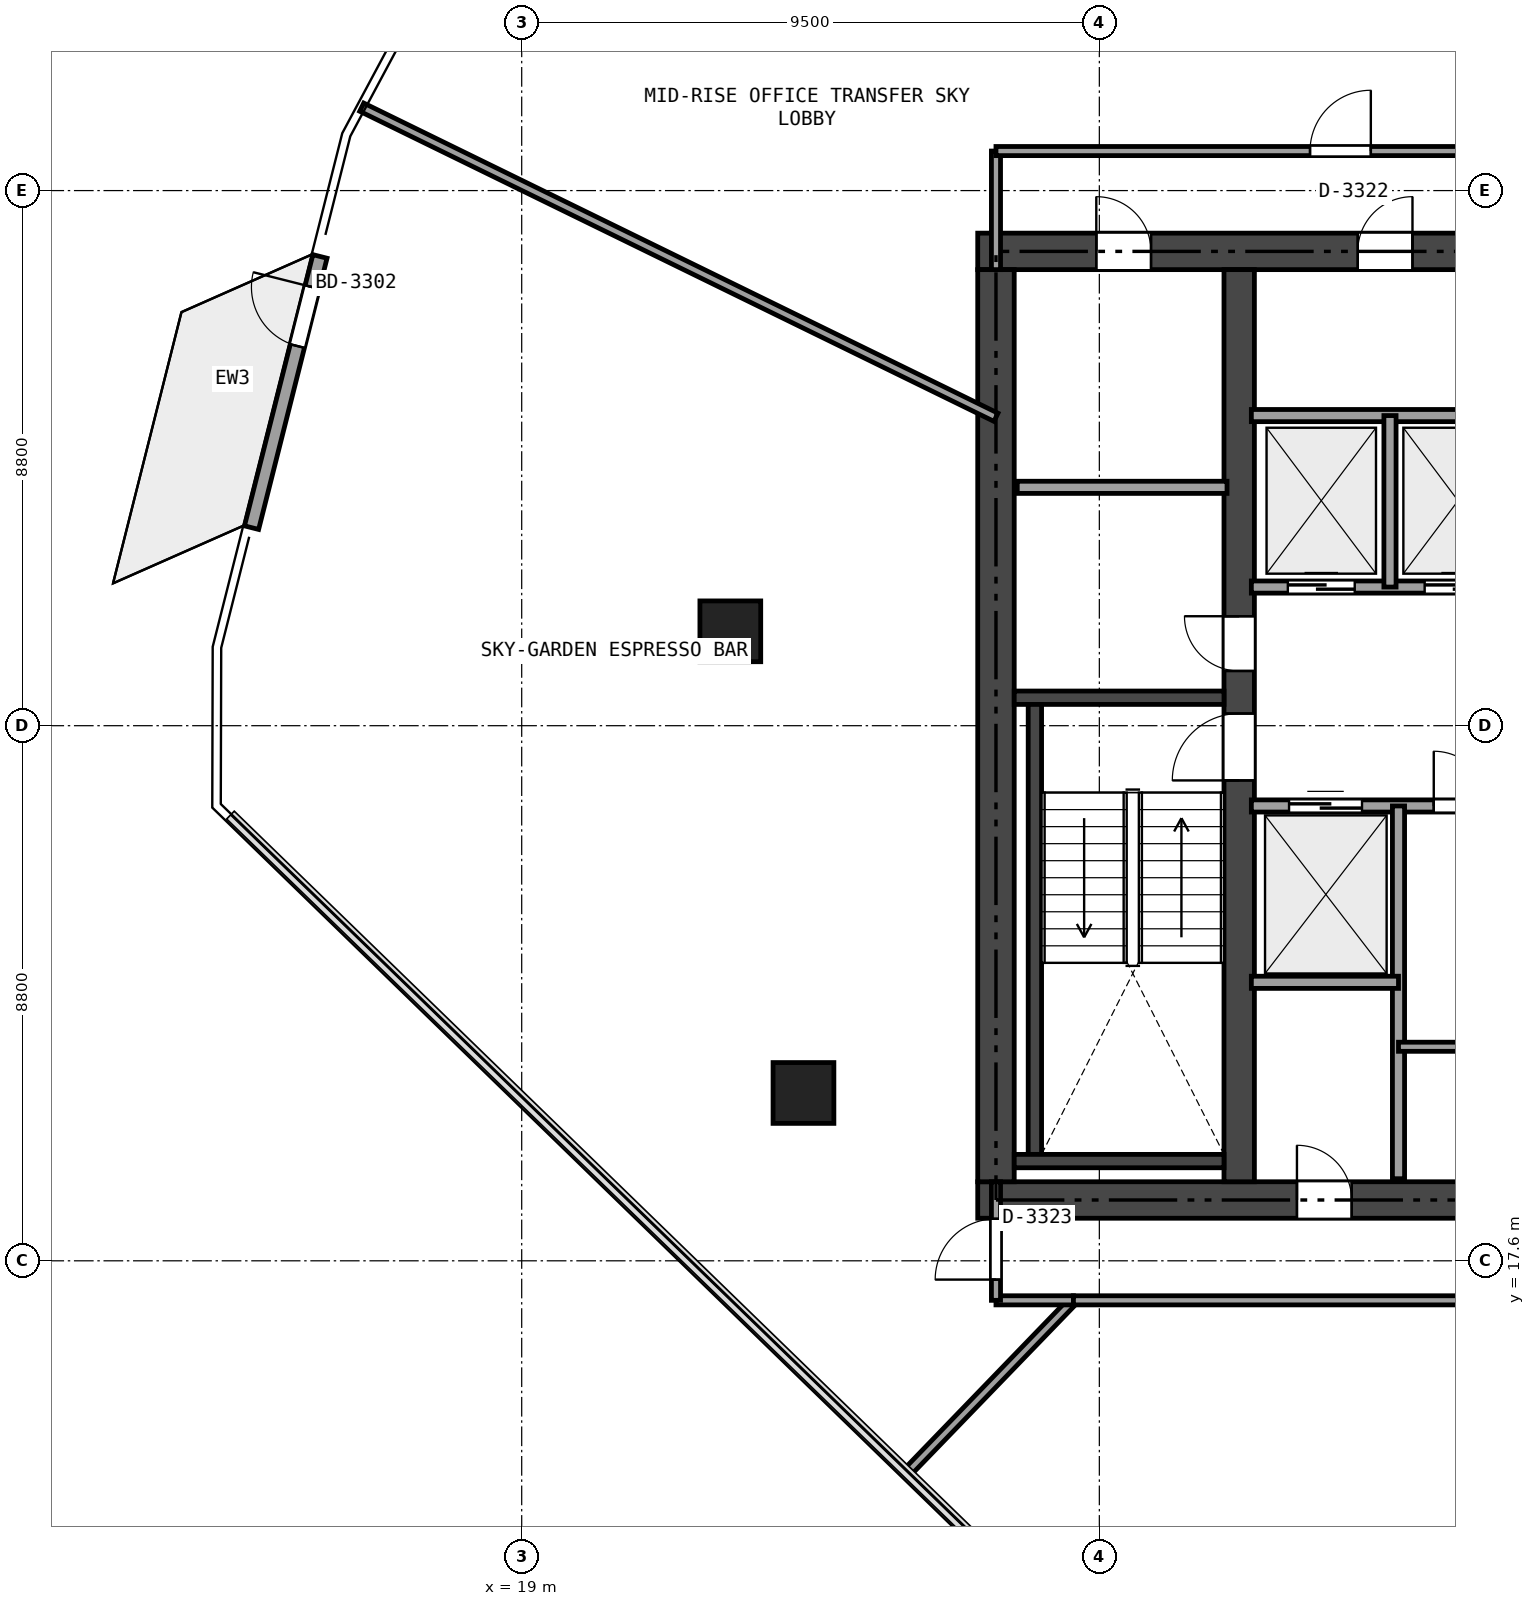
"""IFC4 building model, lengths in metres.
Left out: names, types, materials, properties, quantities, classifications, styles, units other than length and angle.
Written with IfcOpenShell. Run it as: python <this file> out.ifc"""

import sys

from ifc_helpers import new_model, si_unit, direction, frame, frame_2d, origin, origin_2d, place, context, subcontext, project, spatial, rectangle, extrude, element, fill, save


model = new_model("IFC4")
c1 = context("Model", 3, precision=1e-05, world=origin(), true_north=direction((0.0, 1.0)))
c2 = subcontext(c1, "Body", "Model", "MODEL_VIEW")
j1 = project(units=[si_unit("LENGTHUNIT", "METRE"), si_unit("PLANEANGLEUNIT", "RADIAN")], contexts=[c1])
p1 = place(None, origin())
s1 = spatial("IfcSite", under=j1, at=p1, CompositionType="ELEMENT")
p2 = place(p1, origin())
s2 = spatial("IfcBuilding", under=s1, at=p2, CompositionType="ELEMENT")
p3 = place(p2, frame((0.0, 0.0, 125.7)))
s3 = spatial("IfcBuildingStorey", under=s2, at=p3, CompositionType="ELEMENT", Elevation=125.7)
p4 = place(p3, frame((26.5, 18.6, 0.0), z_axis=(0.0, 0.0, 1.0), x_axis=(1.0, 0.0, 0.0)))
e1 = element("IfcWall", 1, at=p4, inside=s3, PredefinedType="SHEAR", context=c2, shape_type="SweptSolid", body=[
    extrude(rectangle(XDim=21.4, YDim=0.6, at=frame_2d((10.7, 0.0))), origin(), (0.0, 0.0, 1.0), 3.32),
])
p5 = place(p4, frame((12.425, 0.0, 0.0)))
e2 = element("IfcOpeningElement", 2, at=p5, cuts=e1, PredefinedType="OPENING", context=c2, shape_type="SweptSolid", body=[
    extrude(rectangle(XDim=1.15, YDim=2.15, at=frame_2d((0.575, 1.075))), frame((0.0, 0.31, 0.0), z_axis=(0.0, -1.0, 0.0), x_axis=(1.0, 0.0, 0.0)), (0.0, 0.0, 1.0), 0.62),
])
p6 = place(p4, frame((5.25, 0.0, 0.0)))
e3 = element("IfcOpeningElement", 3, at=p6, cuts=e1, PredefinedType="OPENING", context=c2, shape_type="SweptSolid", body=[
    extrude(rectangle(XDim=0.9, YDim=2.1, at=frame_2d((0.45, 1.05))), frame((0.0, 0.31, 0.0), z_axis=(0.0, -1.0, 0.0), x_axis=(1.0, 0.0, 0.0)), (0.0, 0.0, 1.0), 0.62),
])
p7 = place(p3, frame((26.5, 34.2, 0.0), z_axis=(0.0, 0.0, 1.0), x_axis=(1.0, 0.0, 0.0)))
e4 = element("IfcWall", 4, at=p7, inside=s3, PredefinedType="SHEAR", context=c2, shape_type="SweptSolid", body=[
    extrude(rectangle(XDim=21.4, YDim=0.6, at=frame_2d((10.7, 0.0))), origin(), (0.0, 0.0, 1.0), 3.32),
])
p8 = place(p7, frame((9.7, 0.0, 0.0)))
e5 = element("IfcOpeningElement", 5, at=p8, cuts=e4, PredefinedType="OPENING", context=c2, shape_type="SweptSolid", body=[
    extrude(rectangle(XDim=1.1, YDim=2.15, at=frame_2d((0.55, 1.075))), frame((0.0, 0.31, 0.0), z_axis=(0.0, -1.0, 0.0), x_axis=(1.0, 0.0, 0.0)), (0.0, 0.0, 1.0), 0.62),
])
p9 = place(p7, frame((1.95, 0.0, 0.0)))
e6 = element("IfcOpeningElement", 6, at=p9, cuts=e4, PredefinedType="OPENING", context=c2, shape_type="SweptSolid", body=[
    extrude(rectangle(XDim=0.9, YDim=2.1, at=frame_2d((0.45, 1.05))), frame((0.0, 0.31, 0.0), z_axis=(0.0, -1.0, 0.0), x_axis=(1.0, 0.0, 0.0)), (0.0, 0.0, 1.0), 0.62),
])
p10 = place(p7, frame((6.25, 0.0, 0.0)))
e7 = element("IfcOpeningElement", 7, at=p10, cuts=e4, PredefinedType="OPENING", context=c2, shape_type="SweptSolid", body=[
    extrude(rectangle(XDim=0.9, YDim=2.1, at=frame_2d((0.45, 1.05))), frame((0.0, 0.31, 0.0), z_axis=(0.0, -1.0, 0.0), x_axis=(1.0, 0.0, 0.0)), (0.0, 0.0, 1.0), 0.62),
])
p11 = place(p3, frame((26.8, 18.9, 0.0), z_axis=(0.0, 0.0, 1.0), x_axis=(0.0, 1.0, 0.0)))
e8 = element("IfcWall", 8, at=p11, inside=s3, PredefinedType="SHEAR", context=c2, shape_type="SweptSolid", body=[
    extrude(rectangle(XDim=15.0, YDim=0.6, at=frame_2d((7.5, 0.0))), origin(), (0.0, 0.0, 1.0), 3.32),
])
p12 = place(p3, frame((30.8, 18.9, 0.0), z_axis=(0.0, 0.0, 1.0), x_axis=(0.0, 1.0, 0.0)))
e9 = element("IfcWall", 9, at=p12, inside=s3, PredefinedType="SHEAR", context=c2, shape_type="SweptSolid", body=[
    extrude(rectangle(XDim=15.0, YDim=0.5, at=frame_2d((7.5, 0.0))), origin(), (0.0, 0.0, 1.0), 3.32),
])
p13 = place(p12, frame((6.6, 0.0, 0.0)))
e10 = element("IfcOpeningElement", 10, at=p13, cuts=e9, PredefinedType="OPENING", context=c2, shape_type="SweptSolid", body=[
    extrude(rectangle(XDim=1.1, YDim=2.15, at=frame_2d((0.55, 1.075))), frame((0.0, 0.26, 0.0), z_axis=(0.0, -1.0, 0.0), x_axis=(1.0, 0.0, 0.0)), (0.0, 0.0, 1.0), 0.52),
])
p14 = place(p12, frame((8.4, 0.0, 0.0)))
e11 = element("IfcOpeningElement", 11, at=p14, cuts=e9, PredefinedType="OPENING", context=c2, shape_type="SweptSolid", body=[
    extrude(rectangle(XDim=0.9, YDim=2.1, at=frame_2d((0.45, 1.05))), frame((0.0, 0.26, 0.0), z_axis=(0.0, -1.0, 0.0), x_axis=(1.0, 0.0, 0.0)), (0.0, 0.0, 1.0), 0.52),
])
p15 = place(p3, frame((27.1, 26.86, 0.0), z_axis=(0.0, 0.0, 1.0), x_axis=(1.0, 0.0, 0.0)))
e12 = element("IfcWall", 12, at=p15, inside=s3, PredefinedType="SHEAR", context=c2, shape_type="SweptSolid", body=[
    extrude(rectangle(XDim=3.45, YDim=0.22, at=frame_2d((1.725, 0.0))), origin(), (0.0, 0.0, 1.0), 3.32),
])
p16 = place(p3, frame((27.44, 19.35, 0.0), z_axis=(0.0, 0.0, 1.0), x_axis=(0.0, 1.0, 0.0)))
e13 = element("IfcWall", 13, at=p16, inside=s3, PredefinedType="SHEAR", context=c2, shape_type="SweptSolid", body=[
    extrude(rectangle(XDim=7.4, YDim=0.22, at=frame_2d((3.7, 0.0))), origin(), (0.0, 0.0, 1.0), 3.32),
])
p17 = place(p3, frame((27.1, 19.24, 0.0), z_axis=(0.0, 0.0, 1.0), x_axis=(1.0, 0.0, 0.0)))
e14 = element("IfcWall", 14, at=p17, inside=s3, PredefinedType="SHEAR", context=c2, shape_type="SweptSolid", body=[
    extrude(rectangle(XDim=3.45, YDim=0.22, at=frame_2d((1.725, 0.0))), origin(), (0.0, 0.0, 1.0), 3.32),
])
for number, where, z_axis, x_axis in (
    (15, (22.431, 27.952, -0.405), (0.0, 0.0, 1.0), (1.0, 0.0, 0.0)),
    (16, (23.634, 20.36, -0.405), (0.0, 0.0, 1.0), (1.0, 0.0, 0.0)),
):
    element("IfcColumn", number, at=place(p3, frame(where, z_axis=z_axis, x_axis=x_axis)), inside=s3, PredefinedType="COLUMN", context=c2, shape_type="SweptSolid", body=[
        extrude(rectangle(XDim=1.0, YDim=1.0, at=origin_2d()), origin(), (0.0, 0.0, 1.0), 3.725),
    ])
p18 = place(p3, frame((14.557, 29.657, 0.0), z_axis=(0.0, 0.0, 1.0), x_axis=(0.244583269574, 0.969628291792, 0.0)))
e17 = element("IfcWall", 17, at=p18, inside=s3, PredefinedType="SOLIDWALL", context=c2, shape_type="SweptSolid", body=[
    extrude(rectangle(XDim=4.6, YDim=0.24, at=frame_2d((2.3, 0.0))), origin(), (0.0, 0.0, 1.0), 3.32),
])
p19 = place(p18, frame((3.08, 0.0, 0.0)))
e18 = element("IfcOpeningElement", 18, at=p19, cuts=e17, PredefinedType="OPENING", context=c2, shape_type="SweptSolid", body=[
    extrude(rectangle(XDim=1.0, YDim=2.15, at=frame_2d((0.5, 1.075))), frame((0.0, 0.13, 0.0), z_axis=(0.0, -1.0, 0.0), x_axis=(1.0, 0.0, 0.0)), (0.0, 0.0, 1.0), 0.26),
])
p20 = place(p3, frame((27.15, 30.32, 0.0), z_axis=(0.0, 0.0, 1.0), x_axis=(1.0, 0.0, 0.0)))
e19 = element("IfcWall", 19, at=p20, inside=s3, PredefinedType="SOLIDWALL", context=c2, shape_type="SweptSolid", body=[
    extrude(rectangle(XDim=3.45, YDim=0.2, at=frame_2d((1.725, 0.0))), origin(), (0.0, 0.0, 1.0), 3.32),
])
p21 = place(p3, frame((31.0, 28.68, 0.0), z_axis=(0.0, 0.0, 1.0), x_axis=(1.0, 0.0, 0.0)))
e20 = element("IfcWall", 20, at=p21, inside=s3, PredefinedType="SOLIDWALL", context=c2, shape_type="SweptSolid", body=[
    extrude(rectangle(XDim=4.42, YDim=0.2, at=frame_2d((2.21, 0.0))), origin(), (0.0, 0.0, 1.0), 3.32),
])
p22 = place(p21, frame((0.6, 0.0, 0.0)))
e21 = element("IfcOpeningElement", 21, at=p22, cuts=e20, PredefinedType="OPENING", context=c2, shape_type="SweptSolid", body=[
    extrude(rectangle(XDim=1.1, YDim=2.15, at=frame_2d((0.55, 1.075))), frame((0.0, 0.11, 0.0), z_axis=(0.0, -1.0, 0.0), x_axis=(1.0, 0.0, 0.0)), (0.0, 0.0, 1.0), 0.22),
])
p23 = place(p21, frame((2.85, 0.0, 0.0)))
e22 = element("IfcOpeningElement", 22, at=p23, cuts=e20, PredefinedType="OPENING", context=c2, shape_type="SweptSolid", body=[
    extrude(rectangle(XDim=1.1, YDim=2.15, at=frame_2d((0.55, 1.075))), frame((0.0, 0.11, 0.0), z_axis=(0.0, -1.0, 0.0), x_axis=(1.0, 0.0, 0.0)), (0.0, 0.0, 1.0), 0.22),
])
p24 = place(p3, frame((31.0, 31.5, 0.0), z_axis=(0.0, 0.0, 1.0), x_axis=(1.0, 0.0, 0.0)))
e23 = element("IfcWall", 23, at=p24, inside=s3, PredefinedType="SOLIDWALL", context=c2, shape_type="SweptSolid", body=[
    extrude(rectangle(XDim=4.42, YDim=0.2, at=frame_2d((2.21, 0.0))), origin(), (0.0, 0.0, 1.0), 3.32),
])
p25 = place(p3, frame((33.28, 28.68, 0.0), z_axis=(0.0, 0.0, 1.0), x_axis=(0.0, 1.0, 0.0)))
e24 = element("IfcWall", 24, at=p25, inside=s3, PredefinedType="SOLIDWALL", context=c2, shape_type="SweptSolid", body=[
    extrude(rectangle(XDim=2.82, YDim=0.2, at=frame_2d((1.41, 0.0))), origin(), (0.0, 0.0, 1.0), 3.32),
])
p26 = place(p3, frame((31.0, 25.08, 0.0), z_axis=(0.0, 0.0, 1.0), x_axis=(1.0, 0.0, 0.0)))
e25 = element("IfcWall", 25, at=p26, inside=s3, PredefinedType="SOLIDWALL", context=c2, shape_type="SweptSolid", body=[
    extrude(rectangle(XDim=4.42, YDim=0.2, at=frame_2d((2.21, 0.0))), origin(), (0.0, 0.0, 1.0), 3.32),
])
p27 = place(p26, frame((3.0, 0.0, 0.0)))
e26 = element("IfcOpeningElement", 26, at=p27, cuts=e25, PredefinedType="OPENING", context=c2, shape_type="SweptSolid", body=[
    extrude(rectangle(XDim=0.9, YDim=2.1, at=frame_2d((0.45, 1.05))), frame((0.0, 0.11, 0.0), z_axis=(0.0, -1.0, 0.0), x_axis=(1.0, 0.0, 0.0)), (0.0, 0.0, 1.0), 0.22),
])
p28 = place(p26, frame((0.62, 0.0, 0.0)))
e27 = element("IfcOpeningElement", 27, at=p28, cuts=e25, PredefinedType="OPENING", context=c2, shape_type="SweptSolid", body=[
    extrude(rectangle(XDim=1.2, YDim=2.15, at=frame_2d((0.6, 1.075))), frame((0.0, 0.11, 0.0), z_axis=(0.0, -1.0, 0.0), x_axis=(1.0, 0.0, 0.0)), (0.0, 0.0, 1.0), 0.22),
])
p29 = place(p3, frame((33.42, 18.95, 0.0), z_axis=(0.0, 0.0, 1.0), x_axis=(0.0, 1.0, 0.0)))
e28 = element("IfcWall", 28, at=p29, inside=s3, PredefinedType="SOLIDWALL", context=c2, shape_type="SweptSolid", body=[
    extrude(rectangle(XDim=6.13, YDim=0.2, at=frame_2d((3.065, 0.0))), origin(), (0.0, 0.0, 1.0), 2.841),
])
p30 = place(p3, frame((31.0, 22.18, 0.0), z_axis=(0.0, 0.0, 1.0), x_axis=(1.0, 0.0, 0.0)))
e29 = element("IfcWall", 29, at=p30, inside=s3, PredefinedType="SOLIDWALL", context=c2, shape_type="SweptSolid", body=[
    extrude(rectangle(XDim=2.42, YDim=0.2, at=frame_2d((1.21, 0.0))), origin(), (0.0, 0.0, 1.0), 3.32),
])
p31 = place(p3, frame((33.42, 21.12, 0.0), z_axis=(0.0, 0.0, 1.0), x_axis=(1.0, 0.0, 0.0)))
e30 = element("IfcWall", 30, at=p31, inside=s3, PredefinedType="PARTITIONING", context=c2, shape_type="SweptSolid", body=[
    extrude(rectangle(XDim=2.0, YDim=0.15, at=frame_2d((1.0, 0.0))), origin(), (0.0, 0.0, 1.0), 3.32),
])
p32 = place(p3, frame((16.369, 36.572, 0.0), z_axis=(0.0, 0.0, 1.0), x_axis=(0.898369979751, -0.43923954681, 0.0)))
e31 = element("IfcWall", 31, at=p32, inside=s3, PredefinedType="PARTITIONING", context=c2, shape_type="SweptSolid", body=[
    extrude(rectangle(XDim=11.611, YDim=0.15, at=frame_2d((5.806, 0.0))), origin(), (0.0, 0.0, 1.0), 2.805),
])
p33 = place(p3, frame((26.8, 33.9, 0.0), z_axis=(0.0, 0.0, 1.0), x_axis=(0.0, 1.0, 0.0)))
e32 = element("IfcWall", 32, at=p33, inside=s3, PredefinedType="PARTITIONING", context=c2, shape_type="SweptSolid", body=[
    extrude(rectangle(XDim=1.95, YDim=0.15, at=frame_2d((0.975, 0.0))), origin(), (0.0, 0.0, 1.0), 2.805),
])
p34 = place(p3, frame((26.8, 35.85, 0.0), z_axis=(0.0, 0.0, 1.0), x_axis=(1.0, 0.0, 0.0)))
e33 = element("IfcWall", 33, at=p34, inside=s3, PredefinedType="PARTITIONING", context=c2, shape_type="SweptSolid", body=[
    extrude(rectangle(XDim=11.33, YDim=0.15, at=frame_2d((5.665, 0.0))), origin(), (0.0, 0.0, 1.0), 2.687),
])
p35 = place(p34, frame((5.165, 0.0, 0.0)))
e34 = element("IfcOpeningElement", 34, at=p35, cuts=e33, PredefinedType="OPENING", context=c2, shape_type="SweptSolid", body=[
    extrude(rectangle(XDim=1.0, YDim=2.15, at=frame_2d((0.5, 1.075))), frame((0.0, 0.085, 0.0), z_axis=(0.0, -1.0, 0.0), x_axis=(1.0, 0.0, 0.0)), (0.0, 0.0, 1.0), 0.17),
])
p36 = place(p3, frame((25.313, 14.092, 0.0), z_axis=(0.0, 0.0, 1.0), x_axis=(0.694806096169, 0.719197113958, 0.0)))
e35 = element("IfcWall", 35, at=p36, inside=s3, PredefinedType="PARTITIONING", context=c2, shape_type="SweptSolid", body=[
    extrude(rectangle(XDim=3.974, YDim=0.15, at=frame_2d((1.987, 0.0))), origin(), (0.0, 0.0, 1.0), 2.805),
])
p37 = place(p3, frame((28.074, 16.95, 0.0), z_axis=(0.0, 0.0, 1.0), x_axis=(-1.0, 0.0, 0.0)))
e36 = element("IfcWall", 36, at=p37, inside=s3, PredefinedType="PARTITIONING", context=c2, shape_type="SweptSolid", body=[
    extrude(rectangle(XDim=1.274, YDim=0.15, at=frame_2d((0.637, 0.0))), origin(), (0.0, 0.0, 1.0), 2.805),
])
p38 = place(p3, frame((26.8, 16.95, 0.0), z_axis=(0.0, 0.0, 1.0), x_axis=(0.0, 1.0, 0.0)))
e37 = element("IfcWall", 37, at=p38, inside=s3, PredefinedType="PARTITIONING", context=c2, shape_type="SweptSolid", body=[
    extrude(rectangle(XDim=1.95, YDim=0.15, at=frame_2d((0.975, 0.0))), origin(), (0.0, 0.0, 1.0), 2.805),
])
p39 = place(p38, frame((0.341, 0.0, 0.0)))
e38 = element("IfcOpeningElement", 38, at=p39, cuts=e37, PredefinedType="OPENING", context=c2, shape_type="SweptSolid", body=[
    extrude(rectangle(XDim=1.0, YDim=2.15, at=frame_2d((0.5, 1.075))), frame((0.0, 0.085, 0.0), z_axis=(0.0, -1.0, 0.0), x_axis=(1.0, 0.0, 0.0)), (0.0, 0.0, 1.0), 0.17),
])
p40 = place(p3, frame((42.225, 16.95, 0.0), z_axis=(0.0, 0.0, 1.0), x_axis=(-1.0, 0.0, 0.0)))
e39 = element("IfcWall", 39, at=p40, inside=s3, PredefinedType="PARTITIONING", context=c2, shape_type="SweptSolid", body=[
    extrude(rectangle(XDim=14.151, YDim=0.15, at=frame_2d((7.076, 0.0))), origin(), (0.0, 0.0, 1.0), 2.687),
])
p41 = place(p40, frame((6.576, 0.0, 0.0)))
e40 = element("IfcOpeningElement", 40, at=p41, cuts=e39, PredefinedType="OPENING", context=c2, shape_type="SweptSolid", body=[
    extrude(rectangle(XDim=1.0, YDim=2.15, at=frame_2d((0.5, 1.075))), frame((0.0, 0.085, 0.0), z_axis=(0.0, -1.0, 0.0), x_axis=(1.0, 0.0, 0.0)), (0.0, 0.0, 1.0), 0.17),
])
p42 = place(p19, origin())
e41 = element("IfcDoor", 41, at=p42, inside=s3, OperationType="SINGLE_SWING_RIGHT", PredefinedType="DOOR", context=c2, shape_type="SweptSolid", body=[
    extrude(rectangle(XDim=1.0, YDim=2.15, at=frame_2d((0.5, 1.075))), frame((0.0, 0.025, 0.0), z_axis=(0.0, -1.0, 0.0), x_axis=(1.0, 0.0, 0.0)), (0.0, 0.0, 1.0), 0.05),
])
fill(e18, e41)
p43 = place(p13, origin())
e42 = element("IfcDoor", 42, at=p43, inside=s3, OperationType="SINGLE_SWING_LEFT", PredefinedType="DOOR", context=c2, shape_type="SweptSolid", body=[
    extrude(rectangle(XDim=1.1, YDim=2.15, at=frame_2d((0.55, 1.075))), frame((0.0, 0.025, 0.0), z_axis=(0.0, -1.0, 0.0), x_axis=(1.0, 0.0, 0.0)), (0.0, 0.0, 1.0), 0.05),
])
fill(e10, e42)
p44 = place(p14, origin())
e43 = element("IfcDoor", 43, at=p44, inside=s3, OperationType="SINGLE_SWING_RIGHT", PredefinedType="DOOR", context=c2, shape_type="SweptSolid", body=[
    extrude(rectangle(XDim=0.9, YDim=2.1, at=frame_2d((0.45, 1.05))), frame((0.0, 0.025, 0.0), z_axis=(0.0, -1.0, 0.0), x_axis=(1.0, 0.0, 0.0)), (0.0, 0.0, 1.0), 0.05),
])
fill(e11, e43)
p45 = place(p9, origin())
e44 = element("IfcDoor", 44, at=p45, inside=s3, OperationType="SINGLE_SWING_LEFT", PredefinedType="DOOR", context=c2, shape_type="SweptSolid", body=[
    extrude(rectangle(XDim=0.9, YDim=2.1, at=frame_2d((0.45, 1.05))), frame((0.0, 0.025, 0.0), z_axis=(0.0, -1.0, 0.0), x_axis=(1.0, 0.0, 0.0)), (0.0, 0.0, 1.0), 0.05),
])
fill(e6, e44)
p46 = place(p10, origin())
e45 = element("IfcDoor", 45, at=p46, inside=s3, OperationType="SINGLE_SWING_RIGHT", PredefinedType="DOOR", context=c2, shape_type="SweptSolid", body=[
    extrude(rectangle(XDim=0.9, YDim=2.1, at=frame_2d((0.45, 1.05))), frame((0.0, 0.025, 0.0), z_axis=(0.0, -1.0, 0.0), x_axis=(1.0, 0.0, 0.0)), (0.0, 0.0, 1.0), 0.05),
])
fill(e7, e45)
p47 = place(p6, origin())
e46 = element("IfcDoor", 46, at=p47, inside=s3, OperationType="SINGLE_SWING_LEFT", PredefinedType="DOOR", context=c2, shape_type="SweptSolid", body=[
    extrude(rectangle(XDim=0.9, YDim=2.1, at=frame_2d((0.45, 1.05))), frame((0.0, 0.025, 0.0), z_axis=(0.0, -1.0, 0.0), x_axis=(1.0, 0.0, 0.0)), (0.0, 0.0, 1.0), 0.05),
])
fill(e3, e46)
p48 = place(p27, origin())
e47 = element("IfcDoor", 47, at=p48, inside=s3, OperationType="SINGLE_SWING_LEFT", PredefinedType="DOOR", context=c2, shape_type="SweptSolid", body=[
    extrude(rectangle(XDim=0.9, YDim=2.1, at=frame_2d((0.45, 1.05))), frame((0.0, 0.025, 0.0), z_axis=(0.0, -1.0, 0.0), x_axis=(1.0, 0.0, 0.0)), (0.0, 0.0, 1.0), 0.05),
])
fill(e26, e47)
p49 = place(p22, origin())
e48 = element("IfcDoor", 48, at=p49, inside=s3, OperationType="SLIDING_TO_LEFT", PredefinedType="DOOR", context=c2, shape_type="SweptSolid", body=[
    extrude(rectangle(XDim=1.1, YDim=2.15, at=frame_2d((0.55, 1.075))), frame((0.0, 0.025, 0.0), z_axis=(0.0, -1.0, 0.0), x_axis=(1.0, 0.0, 0.0)), (0.0, 0.0, 1.0), 0.05),
])
fill(e21, e48)
p50 = place(p23, origin())
e49 = element("IfcDoor", 49, at=p50, inside=s3, OperationType="SLIDING_TO_LEFT", PredefinedType="DOOR", context=c2, shape_type="SweptSolid", body=[
    extrude(rectangle(XDim=1.1, YDim=2.15, at=frame_2d((0.55, 1.075))), frame((0.0, 0.025, 0.0), z_axis=(0.0, -1.0, 0.0), x_axis=(1.0, 0.0, 0.0)), (0.0, 0.0, 1.0), 0.05),
])
fill(e22, e49)
p51 = place(p28, origin())
e50 = element("IfcDoor", 50, at=p51, inside=s3, OperationType="SLIDING_TO_LEFT", PredefinedType="DOOR", context=c2, shape_type="SweptSolid", body=[
    extrude(rectangle(XDim=1.2, YDim=2.15, at=frame_2d((0.6, 1.075))), frame((0.0, 0.025, 0.0), z_axis=(0.0, -1.0, 0.0), x_axis=(1.0, 0.0, 0.0)), (0.0, 0.0, 1.0), 0.05),
])
fill(e27, e50)
p52 = place(p35, origin())
e51 = element("IfcDoor", 51, at=p52, inside=s3, OperationType="SINGLE_SWING_RIGHT", PredefinedType="DOOR", context=c2, shape_type="SweptSolid", body=[
    extrude(rectangle(XDim=1.0, YDim=2.15, at=frame_2d((0.5, 1.075))), frame((0.0, 0.025, 0.0), z_axis=(0.0, -1.0, 0.0), x_axis=(1.0, 0.0, 0.0)), (0.0, 0.0, 1.0), 0.05),
])
fill(e34, e51)
p53 = place(p39, origin())
e52 = element("IfcDoor", 52, at=p53, inside=s3, OperationType="SINGLE_SWING_LEFT", PredefinedType="DOOR", context=c2, shape_type="SweptSolid", body=[
    extrude(rectangle(XDim=1.0, YDim=2.15, at=frame_2d((0.5, 1.075))), frame((0.0, 0.025, 0.0), z_axis=(0.0, -1.0, 0.0), x_axis=(1.0, 0.0, 0.0)), (0.0, 0.0, 1.0), 0.05),
])
fill(e38, e52)
save(model, sys.argv[1])
